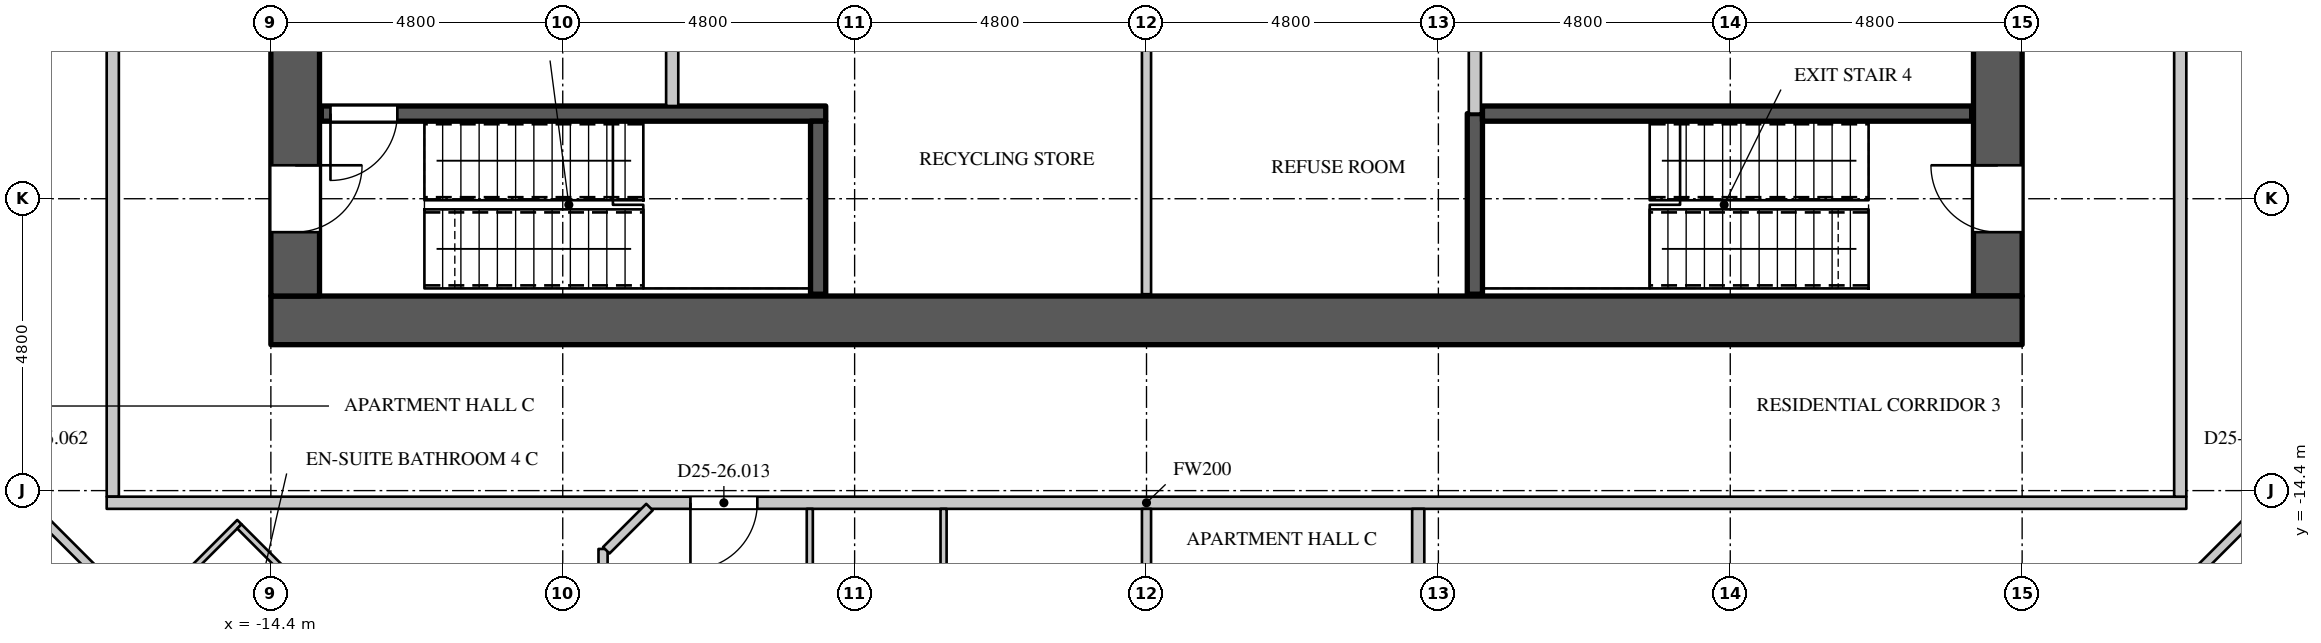
"""IFC4 building model, lengths in metres.
Left out: names, types, materials, properties, quantities, classifications, styles, units other than length and angle.
Written with IfcOpenShell. Run it as: python <this file> out.ifc"""

import sys

from ifc_helpers import new_model, si_unit, direction, frame, frame_2d, origin, place, context, subcontext, project, spatial, rectangle, extrude, element, fill, save


model = new_model("IFC4")
c1 = context("Model", 3, precision=1e-05, world=origin(), true_north=direction((0.0, 1.0)))
c2 = subcontext(c1, "Body", "Model", "MODEL_VIEW")
j1 = project(units=[si_unit("LENGTHUNIT", "METRE"), si_unit("PLANEANGLEUNIT", "RADIAN")], contexts=[c1])
p1 = place(None, origin())
s1 = spatial("IfcSite", under=j1, at=p1, CompositionType="ELEMENT")
p2 = place(p1, origin())
s2 = spatial("IfcBuilding", under=s1, at=p2, CompositionType="ELEMENT")
p3 = place(p2, frame((0.0, 0.0, 110.7)))
s3 = spatial("IfcBuildingStorey", under=s2, at=p3, CompositionType="ELEMENT", Elevation=110.7)
p4 = place(p3, frame((-14.4, -11.6, 0.0), z_axis=(0.0, 0.0, 1.0), x_axis=(1.0, 0.0, 0.0)))
e1 = element("IfcWall", 1, at=p4, inside=s3, PredefinedType="SHEAR", context=c2, shape_type="SweptSolid", body=[
    extrude(rectangle(XDim=28.8, YDim=0.8, at=frame_2d((14.4, 0.0))), origin(), (0.0, 0.0, 1.0), 4.2),
])
p5 = place(p3, frame((14.0, -11.2, 0.0), z_axis=(0.0, 0.0, 1.0), x_axis=(0.0, 1.0, 0.0)))
e2 = element("IfcWall", 2, at=p5, inside=s3, PredefinedType="SHEAR", context=c2, shape_type="SweptSolid", body=[
    extrude(rectangle(XDim=22.4, YDim=0.8, at=frame_2d((11.2, 0.0))), origin(), (0.0, 0.0, 1.0), 4.2),
])
p6 = place(p5, frame((20.25, 0.0, 0.0)))
e3 = element("IfcOpeningElement", 3, at=p6, cuts=e2, PredefinedType="OPENING", context=c2, shape_type="SweptSolid", body=[
    extrude(rectangle(XDim=1.1, YDim=2.2, at=frame_2d((0.55, 1.1))), frame((0.0, 0.41, 0.0), z_axis=(0.0, -1.0, 0.0), x_axis=(1.0, 0.0, 0.0)), (0.0, 0.0, 1.0), 0.82),
])
p7 = place(p5, frame((1.05, 0.0, 0.0)))
e4 = element("IfcOpeningElement", 4, at=p7, cuts=e2, PredefinedType="OPENING", context=c2, shape_type="SweptSolid", body=[
    extrude(rectangle(XDim=1.1, YDim=2.2, at=frame_2d((0.55, 1.1))), frame((0.0, 0.41, 0.0), z_axis=(0.0, -1.0, 0.0), x_axis=(1.0, 0.0, 0.0)), (0.0, 0.0, 1.0), 0.82),
])
p8 = place(p5, frame((14.75, 0.0, 0.0)))
e5 = element("IfcOpeningElement", 5, at=p8, cuts=e2, PredefinedType="OPENING", context=c2, shape_type="SweptSolid", body=[
    extrude(rectangle(XDim=1.5, YDim=2.4, at=frame_2d((0.75, 1.2))), frame((0.0, 0.41, 0.0), z_axis=(0.0, -1.0, 0.0), x_axis=(1.0, 0.0, 0.0)), (0.0, 0.0, 1.0), 0.82),
])
p9 = place(p5, frame((6.15, 0.0, 0.0)))
e6 = element("IfcOpeningElement", 6, at=p9, cuts=e2, PredefinedType="OPENING", context=c2, shape_type="SweptSolid", body=[
    extrude(rectangle(XDim=1.5, YDim=2.4, at=frame_2d((0.75, 1.2))), frame((0.0, 0.41, 0.0), z_axis=(0.0, -1.0, 0.0), x_axis=(1.0, 0.0, 0.0)), (0.0, 0.0, 1.0), 0.82),
])
p10 = place(p3, frame((-14.0, -11.2, 0.0), z_axis=(0.0, 0.0, 1.0), x_axis=(0.0, 1.0, 0.0)))
e7 = element("IfcWall", 7, at=p10, inside=s3, PredefinedType="SHEAR", context=c2, shape_type="SweptSolid", body=[
    extrude(rectangle(XDim=22.4, YDim=0.8, at=frame_2d((11.2, 0.0))), origin(), (0.0, 0.0, 1.0), 4.2),
])
p11 = place(p10, frame((20.25, 0.0, 0.0)))
e8 = element("IfcOpeningElement", 8, at=p11, cuts=e7, PredefinedType="OPENING", context=c2, shape_type="SweptSolid", body=[
    extrude(rectangle(XDim=1.1, YDim=2.2, at=frame_2d((0.55, 1.1))), frame((0.0, 0.41, 0.0), z_axis=(0.0, -1.0, 0.0), x_axis=(1.0, 0.0, 0.0)), (0.0, 0.0, 1.0), 0.82),
])
p12 = place(p10, frame((1.05, 0.0, 0.0)))
e9 = element("IfcOpeningElement", 9, at=p12, cuts=e7, PredefinedType="OPENING", context=c2, shape_type="SweptSolid", body=[
    extrude(rectangle(XDim=1.1, YDim=2.2, at=frame_2d((0.55, 1.1))), frame((0.0, 0.41, 0.0), z_axis=(0.0, -1.0, 0.0), x_axis=(1.0, 0.0, 0.0)), (0.0, 0.0, 1.0), 0.82),
])
p13 = place(p10, frame((15.95, 0.0, 0.0)))
e10 = element("IfcOpeningElement", 10, at=p13, cuts=e7, PredefinedType="OPENING", context=c2, shape_type="SweptSolid", body=[
    extrude(rectangle(XDim=1.5, YDim=2.4, at=frame_2d((0.75, 1.2))), frame((0.0, 0.41, 0.0), z_axis=(0.0, -1.0, 0.0), x_axis=(1.0, 0.0, 0.0)), (0.0, 0.0, 1.0), 0.82),
])
p14 = place(p10, frame((4.95, 0.0, 0.0)))
e11 = element("IfcOpeningElement", 11, at=p14, cuts=e7, PredefinedType="OPENING", context=c2, shape_type="SweptSolid", body=[
    extrude(rectangle(XDim=1.5, YDim=2.4, at=frame_2d((0.75, 1.2))), frame((0.0, 0.41, 0.0), z_axis=(0.0, -1.0, 0.0), x_axis=(1.0, 0.0, 0.0)), (0.0, 0.0, 1.0), 0.82),
])
p15 = place(p3, frame((-17.0, -14.5, 0.0), z_axis=(0.0, 0.0, 1.0), x_axis=(0.0, 1.0, 0.0)))
e12 = element("IfcWall", 12, at=p15, inside=s3, PredefinedType="PARTITIONING", context=c2, shape_type="SweptSolid", body=[
    extrude(rectangle(XDim=29.0, YDim=0.2, at=frame_2d((14.5, 0.0))), origin(), (0.0, 0.0, 1.0), 3.95),
])
p16 = place(p15, frame((11.5, 0.0, 0.0)))
e13 = element("IfcOpeningElement", 13, at=p16, cuts=e12, PredefinedType="OPENING", context=c2, shape_type="SweptSolid", body=[
    extrude(rectangle(XDim=1.1, YDim=2.4, at=frame_2d((0.55, 1.2))), frame((0.0, 0.11, 0.0), z_axis=(0.0, -1.0, 0.0), x_axis=(1.0, 0.0, 0.0)), (0.0, 0.0, 1.0), 0.22),
])
p17 = place(p3, frame((-17.1, -14.6, 0.0), z_axis=(0.0, 0.0, 1.0), x_axis=(1.0, 0.0, 0.0)))
e14 = element("IfcWall", 14, at=p17, inside=s3, PredefinedType="PARTITIONING", context=c2, shape_type="SweptSolid", body=[
    extrude(rectangle(XDim=34.2, YDim=0.2, at=frame_2d((17.1, 0.0))), origin(), (0.0, 0.0, 1.0), 3.95),
])
p18 = place(p17, frame((9.6, 0.0, 0.0)))
e15 = element("IfcOpeningElement", 15, at=p18, cuts=e14, PredefinedType="OPENING", context=c2, shape_type="SweptSolid", body=[
    extrude(rectangle(XDim=1.1, YDim=2.4, at=frame_2d((0.55, 1.2))), frame((0.0, 0.11, 0.0), z_axis=(0.0, -1.0, 0.0), x_axis=(1.0, 0.0, 0.0)), (0.0, 0.0, 1.0), 0.22),
])
p19 = place(p3, frame((-7.8, -8.075, 0.0), z_axis=(0.0, 0.0, 1.0), x_axis=(0.0, 1.0, 0.0)))
e16 = element("IfcWall", 16, at=p19, inside=s3, PredefinedType="PARTITIONING", context=c2, shape_type="SweptSolid", body=[
    extrude(rectangle(XDim=5.275, YDim=0.2, at=frame_2d((2.637, 0.0))), origin(), (0.0, 0.0, 1.0), 3.95),
])
p20 = place(p19, frame((3.0, 0.0, 0.0)))
e17 = element("IfcOpeningElement", 17, at=p20, cuts=e16, PredefinedType="OPENING", context=c2, shape_type="SweptSolid", body=[
    extrude(rectangle(XDim=1.5, YDim=2.4, at=frame_2d((0.75, 1.2))), frame((0.0, 0.11, 0.0), z_axis=(0.0, -1.0, 0.0), x_axis=(1.0, 0.0, 0.0)), (0.0, 0.0, 1.0), 0.22),
])
p21 = place(p3, frame((17.0, -14.5, 0.0), z_axis=(0.0, 0.0, 1.0), x_axis=(0.0, 1.0, 0.0)))
e18 = element("IfcWall", 18, at=p21, inside=s3, PredefinedType="PARTITIONING", context=c2, shape_type="SweptSolid", body=[
    extrude(rectangle(XDim=29.0, YDim=0.2, at=frame_2d((14.5, 0.0))), origin(), (0.0, 0.0, 1.0), 3.95),
])
p22 = place(p21, frame((11.55, 0.0, 0.0)))
e19 = element("IfcOpeningElement", 19, at=p22, cuts=e18, PredefinedType="OPENING", context=c2, shape_type="SweptSolid", body=[
    extrude(rectangle(XDim=1.1, YDim=2.4, at=frame_2d((0.55, 1.2))), frame((0.0, 0.11, 0.0), z_axis=(0.0, -1.0, 0.0), x_axis=(1.0, 0.0, 0.0)), (0.0, 0.0, 1.0), 0.22),
])
p23 = place(p3, frame((-21.547, -11.471, 0.0), z_axis=(0.0, 0.0, 1.0), x_axis=(0.707106781187, -0.707106781187, 0.0)))
e20 = element("IfcWall", 20, at=p23, inside=s3, PredefinedType="PARTITIONING", context=c2, shape_type="SweptSolid", body=[
    extrude(rectangle(XDim=7.125, YDim=0.15, at=frame_2d((3.562, 0.0))), origin(), (0.0, 0.0, 1.0), 3.95),
])
p24 = place(p23, frame((2.85, 0.0, 0.0)))
e21 = element("IfcOpeningElement", 21, at=p24, cuts=e20, PredefinedType="OPENING", context=c2, shape_type="SweptSolid", body=[
    extrude(rectangle(XDim=0.95, YDim=2.2, at=frame_2d((0.475, 1.1))), frame((0.0, 0.085, 0.0), z_axis=(0.0, -1.0, 0.0), x_axis=(1.0, 0.0, 0.0)), (0.0, 0.0, 1.0), 0.17),
])
p25 = place(p3, frame((-8.937, -26.455, 0.0), z_axis=(0.0, 0.0, 1.0), x_axis=(0.0, 1.0, 0.0)))
e22 = element("IfcWall", 22, at=p25, inside=s3, PredefinedType="PARTITIONING", context=c2, shape_type="SweptSolid", body=[
    extrude(rectangle(XDim=11.096, YDim=0.15, at=frame_2d((5.548, 0.0))), origin(), (0.0, 0.0, 1.0), 3.95),
])
p26 = place(p25, frame((8.5, 0.0, 0.0)))
e23 = element("IfcOpeningElement", 23, at=p26, cuts=e22, PredefinedType="OPENING", context=c2, shape_type="SweptSolid", body=[
    extrude(rectangle(XDim=0.95, YDim=2.2, at=frame_2d((0.475, 1.1))), frame((0.0, 0.085, 0.0), z_axis=(0.0, -1.0, 0.0), x_axis=(1.0, 0.0, 0.0)), (0.0, 0.0, 1.0), 0.17),
])
p27 = place(p25, frame((1.7, 0.0, 0.0)))
e24 = element("IfcOpeningElement", 24, at=p27, cuts=e22, PredefinedType="OPENING", context=c2, shape_type="SweptSolid", body=[
    extrude(rectangle(XDim=1.5, YDim=2.2, at=frame_2d((0.75, 1.1))), frame((0.0, 0.085, 0.0), z_axis=(0.0, -1.0, 0.0), x_axis=(1.0, 0.0, 0.0)), (0.0, 0.0, 1.0), 0.17),
])
p28 = place(p3, frame((-8.884, -15.381, 0.0), z_axis=(0.0, 0.0, 1.0), x_axis=(0.707106781187, 0.707106781187, 0.0)))
e25 = element("IfcWall", 25, at=p28, inside=s3, PredefinedType="PARTITIONING", context=c2, shape_type="SweptSolid", body=[
    extrude(rectangle(XDim=1.005, YDim=0.15, at=frame_2d((0.502, 0.0))), origin(), (0.0, 0.0, 1.0), 3.95),
])
p29 = place(p3, frame((0.0, -18.82, 0.0), z_axis=(0.0, 0.0, 1.0), x_axis=(0.0, 1.0, 0.0)))
e26 = element("IfcWall", 26, at=p29, inside=s3, PredefinedType="PARTITIONING", context=c2, shape_type="SweptSolid", body=[
    extrude(rectangle(XDim=4.12, YDim=0.15, at=frame_2d((2.06, 0.0))), origin(), (0.0, 0.0, 1.0), 3.95),
])
p30 = place(p29, frame((1.35, 0.0, 0.0)))
e27 = element("IfcOpeningElement", 27, at=p30, cuts=e26, PredefinedType="OPENING", context=c2, shape_type="SweptSolid", body=[
    extrude(rectangle(XDim=0.95, YDim=2.2, at=frame_2d((0.475, 1.1))), frame((0.0, 0.085, 0.0), z_axis=(0.0, -1.0, 0.0), x_axis=(1.0, 0.0, 0.0)), (0.0, 0.0, 1.0), 0.17),
])
p31 = place(p3, frame((0.0, -11.17, 0.0), z_axis=(0.0, 0.0, 1.0), x_axis=(0.0, 1.0, 0.0)))
e28 = element("IfcWall", 28, at=p31, inside=s3, PredefinedType="PARTITIONING", context=c2, shape_type="SweptSolid", body=[
    extrude(rectangle(XDim=5.27, YDim=0.15, at=frame_2d((2.635, 0.0))), origin(), (0.0, 0.0, 1.0), 3.95),
])
p32 = place(p3, frame((15.24, -17.777, 0.0), z_axis=(0.0, 0.0, 1.0), x_axis=(0.707120241298, 0.707093320819, 0.0)))
e29 = element("IfcWall", 29, at=p32, inside=s3, PredefinedType="PARTITIONING", context=c2, shape_type="SweptSolid", body=[
    extrude(rectangle(XDim=9.069, YDim=0.15, at=frame_2d((4.534, 0.0))), origin(), (0.0, 0.0, 1.0), 3.95),
])
p33 = place(p32, frame((5.1, 0.0, 0.0)))
e30 = element("IfcOpeningElement", 30, at=p33, cuts=e29, PredefinedType="OPENING", context=c2, shape_type="SweptSolid", body=[
    extrude(rectangle(XDim=0.95, YDim=2.2, at=frame_2d((0.475, 1.1))), frame((0.0, 0.085, 0.0), z_axis=(0.0, -1.0, 0.0), x_axis=(1.0, 0.0, 0.0)), (0.0, 0.0, 1.0), 0.17),
])
p34 = place(p32, frame((0.4, 0.0, 0.0)))
e31 = element("IfcOpeningElement", 31, at=p34, cuts=e29, PredefinedType="OPENING", context=c2, shape_type="SweptSolid", body=[
    extrude(rectangle(XDim=0.95, YDim=2.2, at=frame_2d((0.475, 1.1))), frame((0.0, 0.085, 0.0), z_axis=(0.0, -1.0, 0.0), x_axis=(1.0, 0.0, 0.0)), (0.0, 0.0, 1.0), 0.17),
])
p35 = place(p32, frame((7.9, 0.0, 0.0)))
e32 = element("IfcOpeningElement", 32, at=p35, cuts=e29, PredefinedType="OPENING", context=c2, shape_type="SweptSolid", body=[
    extrude(rectangle(XDim=0.95, YDim=2.2, at=frame_2d((0.475, 1.1))), frame((0.0, 0.085, 0.0), z_axis=(0.0, -1.0, 0.0), x_axis=(1.0, 0.0, 0.0)), (0.0, 0.0, 1.0), 0.17),
])
p36 = place(p3, frame((4.469, -25.65, 0.0), z_axis=(0.0, 0.0, 1.0), x_axis=(0.0, 1.0, 0.0)))
e33 = element("IfcWall", 33, at=p36, inside=s3, PredefinedType="PARTITIONING", context=c2, shape_type="SweptSolid", body=[
    extrude(rectangle(XDim=10.95, YDim=0.2, at=frame_2d((5.475, 0.0))), origin(), (0.0, 0.0, 1.0), 3.3),
])
p37 = place(p3, frame((5.4, -8.2, 0.0), z_axis=(0.0, 0.0, 1.0), x_axis=(0.0, 1.0, 0.0)))
e34 = element("IfcWall", 34, at=p37, inside=s3, PredefinedType="PARTITIONING", context=c2, shape_type="SweptSolid", body=[
    extrude(rectangle(XDim=2.3, YDim=0.2, at=frame_2d((1.15, 0.0))), origin(), (0.0, 0.0, 1.0), 3.95),
])
p38 = place(p3, frame((-13.57, -8.2, 0.0), z_axis=(0.0, 0.0, 1.0), x_axis=(1.0, 0.0, 0.0)))
e35 = element("IfcWall", 35, at=p38, inside=s3, PredefinedType="SHEAR", context=c2, shape_type="SweptSolid", body=[
    extrude(rectangle(XDim=8.295, YDim=0.25, at=frame_2d((4.147, 0.0))), origin(), (0.0, 0.0, 1.0), 3.95),
])
p39 = place(p38, frame((0.15, 0.0, 0.0)))
e36 = element("IfcOpeningElement", 36, at=p39, cuts=e35, PredefinedType="OPENING", context=c2, shape_type="SweptSolid", body=[
    extrude(rectangle(XDim=1.1, YDim=2.2, at=frame_2d((0.55, 1.1))), frame((0.0, 0.135, 0.0), z_axis=(0.0, -1.0, 0.0), x_axis=(1.0, 0.0, 0.0)), (0.0, 0.0, 1.0), 0.27),
])
p40 = place(p3, frame((-5.4, -11.17, 0.0), z_axis=(0.0, 0.0, 1.0), x_axis=(0.0, 1.0, 0.0)))
e37 = element("IfcWall", 37, at=p40, inside=s3, PredefinedType="SHEAR", context=c2, shape_type="SweptSolid", body=[
    extrude(rectangle(XDim=2.845, YDim=0.25, at=frame_2d((1.422, 0.0))), origin(), (0.0, 0.0, 1.0), 3.95),
])
p41 = place(p3, frame((5.4, -11.17, 0.0), z_axis=(0.0, 0.0, 1.0), x_axis=(0.0, 1.0, 0.0)))
e38 = element("IfcWall", 38, at=p41, inside=s3, PredefinedType="SHEAR", context=c2, shape_type="SweptSolid", body=[
    extrude(rectangle(XDim=2.97, YDim=0.25, at=frame_2d((1.485, 0.0))), origin(), (0.0, 0.0, 1.0), 3.95),
])
p42 = place(p3, frame((5.525, -8.2, 0.0), z_axis=(0.0, 0.0, 1.0), x_axis=(1.0, 0.0, 0.0)))
e39 = element("IfcWall", 39, at=p42, inside=s3, PredefinedType="SHEAR", context=c2, shape_type="SweptSolid", body=[
    extrude(rectangle(XDim=8.045, YDim=0.25, at=frame_2d((4.022, 0.0))), origin(), (0.0, 0.0, 1.0), 3.95),
])
p43 = place(p3, frame((-16.495, -16.495, 0.0), z_axis=(0.0, 0.0, 1.0), x_axis=(0.707106781187, 0.707106781187, 0.0)))
e40 = element("IfcWall", 40, at=p43, inside=s3, PredefinedType="PARTITIONING", context=c2, shape_type="SweptSolid", body=[
    extrude(rectangle(XDim=2.23, YDim=0.1, at=frame_2d((1.115, 0.0))), origin(), (0.0, 0.0, 1.0), 3.95),
])
p44 = place(p3, frame((-14.918, -14.989, 0.0), z_axis=(0.0, 0.0, 1.0), x_axis=(0.707063182409, -0.707150377276, 0.0)))
e41 = element("IfcWall", 41, at=p44, inside=s3, PredefinedType="PARTITIONING", context=c2, shape_type="SweptSolid", body=[
    extrude(rectangle(XDim=2.8, YDim=0.1, at=frame_2d((1.4, 0.0))), origin(), (0.0, 0.0, 1.0), 3.95),
])
p45 = place(p3, frame((-5.537, -20.725, 0.0), z_axis=(0.0, 0.0, 1.0), x_axis=(0.0, 1.0, 0.0)))
e42 = element("IfcWall", 42, at=p45, inside=s3, PredefinedType="PARTITIONING", context=c2, shape_type="SweptSolid", body=[
    extrude(rectangle(XDim=6.025, YDim=0.1, at=frame_2d((3.013, 0.0))), origin(), (0.0, 0.0, 1.0), 3.95),
])
p46 = place(p45, frame((2.55, 0.0, 0.0)))
e43 = element("IfcOpeningElement", 43, at=p46, cuts=e42, PredefinedType="OPENING", context=c2, shape_type="SweptSolid", body=[
    extrude(rectangle(XDim=0.9, YDim=2.2, at=frame_2d((0.45, 1.1))), frame((0.0, 0.06, 0.0), z_axis=(0.0, -1.0, 0.0), x_axis=(1.0, 0.0, 0.0)), (0.0, 0.0, 1.0), 0.12),
])
p47 = place(p3, frame((-3.337, -20.75, 0.0), z_axis=(0.0, 0.0, 1.0), x_axis=(0.0, 1.0, 0.0)))
e44 = element("IfcWall", 44, at=p47, inside=s3, PredefinedType="PARTITIONING", context=c2, shape_type="SweptSolid", body=[
    extrude(rectangle(XDim=6.05, YDim=0.1, at=frame_2d((3.025, 0.0))), origin(), (0.0, 0.0, 1.0), 3.95),
])
p48 = place(p39, origin())
e45 = element("IfcDoor", 45, at=p48, inside=s3, OperationType="SINGLE_SWING_RIGHT", PredefinedType="DOOR", context=c2, shape_type="SweptSolid", body=[
    extrude(rectangle(XDim=1.1, YDim=2.2, at=frame_2d((0.55, 1.1))), frame((0.0, 0.025, 0.0), z_axis=(0.0, -1.0, 0.0), x_axis=(1.0, 0.0, 0.0)), (0.0, 0.0, 1.0), 0.05),
])
fill(e36, e45)
p49 = place(p12, origin())
e46 = element("IfcDoor", 46, at=p49, inside=s3, OperationType="SINGLE_SWING_LEFT", PredefinedType="DOOR", context=c2, shape_type="SweptSolid", body=[
    extrude(rectangle(XDim=1.1, YDim=2.2, at=frame_2d((0.55, 1.1))), frame((0.0, -0.345, 0.0), z_axis=(0.0, -1.0, 0.0), x_axis=(1.0, 0.0, 0.0)), (0.0, 0.0, 1.0), 0.05),
])
fill(e9, e46)
p50 = place(p7, origin())
e47 = element("IfcDoor", 47, at=p50, inside=s3, OperationType="SINGLE_SWING_RIGHT", PredefinedType="DOOR", context=c2, shape_type="SweptSolid", body=[
    extrude(rectangle(XDim=1.1, YDim=2.2, at=frame_2d((0.55, 1.1))), frame((0.0, 0.395, 0.0), z_axis=(0.0, -1.0, 0.0), x_axis=(1.0, 0.0, 0.0)), (0.0, 0.0, 1.0), 0.05),
])
fill(e4, e47)
p51 = place(p18, origin())
e48 = element("IfcDoor", 48, at=p51, inside=s3, OperationType="SINGLE_SWING_RIGHT", PredefinedType="DOOR", context=c2, shape_type="SweptSolid", body=[
    extrude(rectangle(XDim=1.1, YDim=2.4, at=frame_2d((0.55, 1.2))), frame((0.0, 0.025, 0.0), z_axis=(0.0, -1.0, 0.0), x_axis=(1.0, 0.0, 0.0)), (0.0, 0.0, 1.0), 0.05),
])
fill(e15, e48)
save(model, sys.argv[1])
